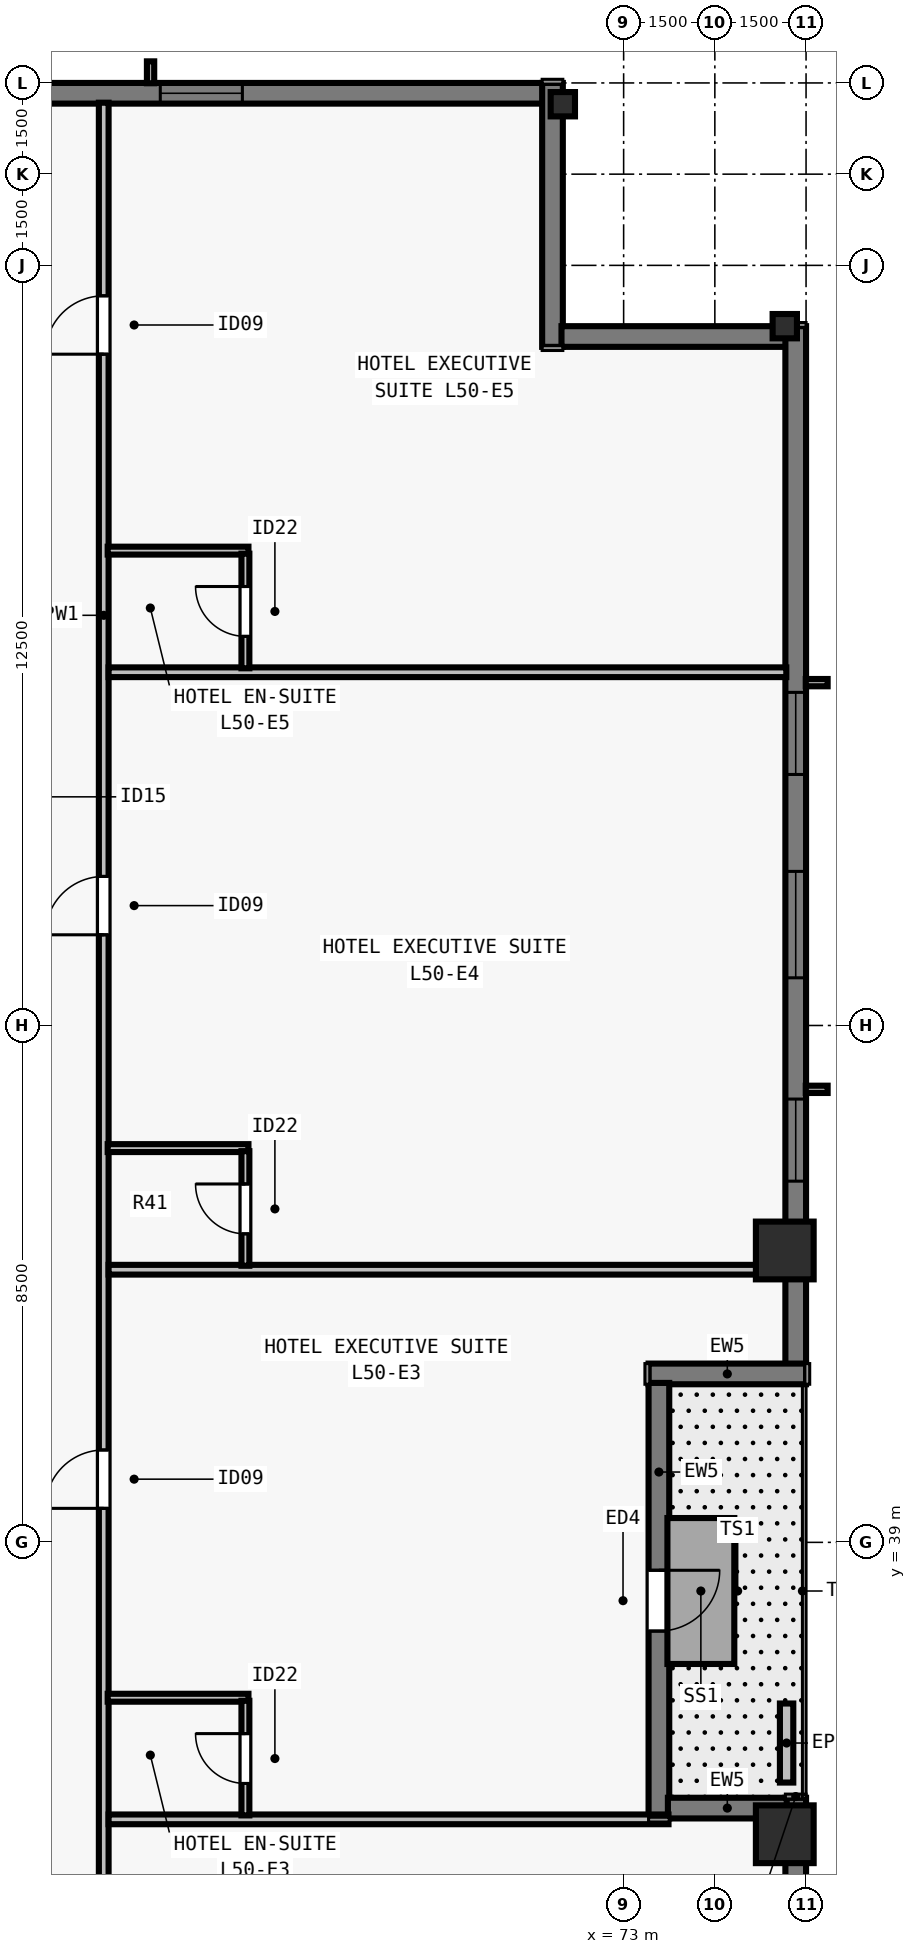
"""IFC4 building model, lengths in metres.
Left out: names, types, materials, properties, quantities, classifications, styles, units other than length and angle.
Written with IfcOpenShell. Run it as: python <this file> out.ifc"""

import sys

from ifc_helpers import new_model, si_unit, direction, frame, frame_2d, origin, origin_2d, place, context, subcontext, project, spatial, rectangle, i_section, extrude, element, fill, save


model = new_model("IFC4")
c1 = context("Model", 3, precision=1e-05, world=origin(), true_north=direction((0.0, 1.0)))
c2 = subcontext(c1, "Body", "Model", "MODEL_VIEW")
j1 = project(units=[si_unit("LENGTHUNIT", "METRE"), si_unit("PLANEANGLEUNIT", "RADIAN")], contexts=[c1])
p1 = place(None, origin())
s1 = spatial("IfcSite", under=j1, at=p1, CompositionType="ELEMENT")
p2 = place(p1, origin())
s2 = spatial("IfcBuilding", under=s1, at=p2, CompositionType="ELEMENT")
p3 = place(p2, frame((0.0, 0.0, 183.0)))
s3 = spatial("IfcBuildingStorey", under=s2, at=p3, CompositionType="ELEMENT", Elevation=183.0)
for number, where, z_axis, x_axis in (
    (1, (75.65, 34.2, 0.0), (0.0, 0.0, 1.0), (0.0, 1.0, 0.0)),
    (2, (75.65, 43.8, 0.0), (0.0, 0.0, 1.0), (0.0, 1.0, 0.0)),
):
    element("IfcColumn", number, at=place(p3, frame(where, z_axis=z_axis, x_axis=x_axis)), inside=s3, PredefinedType="COLUMN", context=c2, shape_type="SweptSolid", body=[
        extrude(rectangle(XDim=0.95, YDim=0.95, at=origin_2d()), origin(), (0.0, 0.0, 1.0), 3.5),
    ])
for number, where, z_axis, x_axis in (
    (3, (75.65, 59.0, 0.0), (0.0, 0.0, 1.0), (0.0, 1.0, 0.0)),
    (4, (72.0, 62.65, 0.0), (0.0, 0.0, 1.0), (1.0, 0.0, 0.0)),
):
    element("IfcColumn", number, at=place(p3, frame(where, z_axis=z_axis, x_axis=x_axis)), inside=s3, PredefinedType="COLUMN", context=c2, shape_type="SweptSolid", body=[
        extrude(i_section(OverallWidth=0.4, OverallDepth=0.4, WebThickness=0.022, FlangeThickness=0.036, at=origin_2d()), origin(), (0.0, 0.0, 1.0), 3.5),
    ])
p4 = place(p3, frame((75.83, 34.8, 0.0), z_axis=(0.0, 0.0, 1.0), x_axis=(0.0, -1.0, 0.0)))
e5 = element("IfcWall", 5, at=p4, inside=s3, PredefinedType="SOLIDWALL", context=c2, shape_type="SweptSolid", body=[
    extrude(rectangle(XDim=15.482, YDim=0.34, at=frame_2d((7.741, 0.0))), origin(), (0.0, 0.0, 1.0), 3.28),
])
p5 = place(p4, frame((2.305, 0.0, 0.8)))
e6 = element("IfcOpeningElement", 6, at=p5, cuts=e5, PredefinedType="OPENING", context=c2, shape_type="SweptSolid", body=[
    extrude(rectangle(XDim=1.35, YDim=1.66, at=frame_2d((0.675, 0.83))), frame((0.0, 0.18, 0.0), z_axis=(0.0, -1.0, 0.0), x_axis=(1.0, 0.0, 0.0)), (0.0, 0.0, 1.0), 0.36),
])
p6 = place(p4, frame((5.566, 0.0, 0.8)))
e7 = element("IfcOpeningElement", 7, at=p6, cuts=e5, PredefinedType="OPENING", context=c2, shape_type="SweptSolid", body=[
    extrude(rectangle(XDim=1.75, YDim=1.66, at=frame_2d((0.875, 0.83))), frame((0.0, 0.18, 0.0), z_axis=(0.0, -1.0, 0.0), x_axis=(1.0, 0.0, 0.0)), (0.0, 0.0, 1.0), 0.36),
])
p7 = place(p4, frame((8.377, 0.0, 0.8)))
e8 = element("IfcOpeningElement", 8, at=p7, cuts=e5, PredefinedType="OPENING", context=c2, shape_type="SweptSolid", body=[
    extrude(rectangle(XDim=1.35, YDim=1.66, at=frame_2d((0.675, 0.83))), frame((0.0, 0.18, 0.0), z_axis=(0.0, -1.0, 0.0), x_axis=(1.0, 0.0, 0.0)), (0.0, 0.0, 1.0), 0.36),
])
p8 = place(p3, frame((32.0, 62.83, 0.0), z_axis=(0.0, 0.0, 1.0), x_axis=(1.0, 0.0, 0.0)))
e9 = element("IfcWall", 9, at=p8, inside=s3, PredefinedType="SOLIDWALL", context=c2, shape_type="SweptSolid", body=[
    extrude(rectangle(XDim=39.682, YDim=0.34, at=frame_2d((19.841, 0.0))), origin(), (0.0, 0.0, 1.0), 3.28),
])
p9 = place(p8, frame((4.102, 0.0, 0.8)))
e10 = element("IfcOpeningElement", 10, at=p9, cuts=e9, PredefinedType="OPENING", context=c2, shape_type="SweptSolid", body=[
    extrude(rectangle(XDim=1.35, YDim=1.66, at=frame_2d((0.675, 0.83))), frame((0.0, 0.18, 0.0), z_axis=(0.0, -1.0, 0.0), x_axis=(1.0, 0.0, 0.0)), (0.0, 0.0, 1.0), 0.36),
])
p10 = place(p8, frame((8.755, 0.0, 0.8)))
e11 = element("IfcOpeningElement", 11, at=p10, cuts=e9, PredefinedType="OPENING", context=c2, shape_type="SweptSolid", body=[
    extrude(rectangle(XDim=1.75, YDim=1.66, at=frame_2d((0.875, 0.83))), frame((0.0, 0.18, 0.0), z_axis=(0.0, -1.0, 0.0), x_axis=(1.0, 0.0, 0.0)), (0.0, 0.0, 1.0), 0.36),
])
p11 = place(p8, frame((12.059, 0.0, 0.8)))
e12 = element("IfcOpeningElement", 12, at=p11, cuts=e9, PredefinedType="OPENING", context=c2, shape_type="SweptSolid", body=[
    extrude(rectangle(XDim=1.35, YDim=1.66, at=frame_2d((0.675, 0.83))), frame((0.0, 0.18, 0.0), z_axis=(0.0, -1.0, 0.0), x_axis=(1.0, 0.0, 0.0)), (0.0, 0.0, 1.0), 0.36),
])
p12 = place(p8, frame((16.262, 0.0, 0.8)))
e13 = element("IfcOpeningElement", 13, at=p12, cuts=e9, PredefinedType="OPENING", context=c2, shape_type="SweptSolid", body=[
    extrude(rectangle(XDim=1.75, YDim=1.66, at=frame_2d((0.875, 0.83))), frame((0.0, 0.18, 0.0), z_axis=(0.0, -1.0, 0.0), x_axis=(1.0, 0.0, 0.0)), (0.0, 0.0, 1.0), 0.36),
])
p13 = place(p8, frame((18.316, 0.0, 0.8)))
e14 = element("IfcOpeningElement", 14, at=p13, cuts=e9, PredefinedType="OPENING", context=c2, shape_type="SweptSolid", body=[
    extrude(rectangle(XDim=1.35, YDim=1.66, at=frame_2d((0.675, 0.83))), frame((0.0, 0.18, 0.0), z_axis=(0.0, -1.0, 0.0), x_axis=(1.0, 0.0, 0.0)), (0.0, 0.0, 1.0), 0.36),
])
p14 = place(p8, frame((22.07, 0.0, 0.8)))
e15 = element("IfcOpeningElement", 15, at=p14, cuts=e9, PredefinedType="OPENING", context=c2, shape_type="SweptSolid", body=[
    extrude(rectangle(XDim=1.75, YDim=1.66, at=frame_2d((0.875, 0.83))), frame((0.0, 0.18, 0.0), z_axis=(0.0, -1.0, 0.0), x_axis=(1.0, 0.0, 0.0)), (0.0, 0.0, 1.0), 0.36),
])
p15 = place(p8, frame((26.273, 0.0, 0.8)))
e16 = element("IfcOpeningElement", 16, at=p15, cuts=e9, PredefinedType="OPENING", context=c2, shape_type="SweptSolid", body=[
    extrude(rectangle(XDim=1.35, YDim=1.66, at=frame_2d((0.675, 0.83))), frame((0.0, 0.18, 0.0), z_axis=(0.0, -1.0, 0.0), x_axis=(1.0, 0.0, 0.0)), (0.0, 0.0, 1.0), 0.36),
])
p16 = place(p8, frame((33.38, 0.0, 0.8)))
e17 = element("IfcOpeningElement", 17, at=p16, cuts=e9, PredefinedType="OPENING", context=c2, shape_type="SweptSolid", body=[
    extrude(rectangle(XDim=1.35, YDim=1.66, at=frame_2d((0.675, 0.83))), frame((0.0, 0.18, 0.0), z_axis=(0.0, -1.0, 0.0), x_axis=(1.0, 0.0, 0.0)), (0.0, 0.0, 1.0), 0.36),
])
p17 = place(p3, frame((71.83, 63.0, 0.0), z_axis=(0.0, 0.0, 1.0), x_axis=(0.0, -1.0, 0.0)))
e18 = element("IfcWall", 18, at=p17, inside=s3, PredefinedType="SOLIDWALL", context=c2, shape_type="SweptSolid", body=[
    extrude(rectangle(XDim=4.34, YDim=0.34, at=frame_2d((2.17, 0.0))), origin(), (0.0, 0.0, 1.0), 3.28),
])
p18 = place(p3, frame((71.978, 58.83, 0.0), z_axis=(0.0, 0.0, 1.0), x_axis=(1.0, 0.0, 0.0)))
e19 = element("IfcWall", 19, at=p18, inside=s3, PredefinedType="SOLIDWALL", context=c2, shape_type="SweptSolid", body=[
    extrude(rectangle(XDim=3.704, YDim=0.34, at=frame_2d((1.852, 0.0))), origin(), (0.0, 0.0, 1.0), 3.28),
])
p19 = place(p3, frame((75.83, 59.0, 0.0), z_axis=(0.0, 0.0, 1.0), x_axis=(0.0, -1.0, 0.0)))
e20 = element("IfcWall", 20, at=p19, inside=s3, PredefinedType="SOLIDWALL", context=c2, shape_type="SweptSolid", body=[
    extrude(rectangle(XDim=17.082, YDim=0.34, at=frame_2d((8.541, 0.0))), origin(), (0.0, 0.0, 1.0), 3.28),
])
p20 = place(p19, frame((6.022, 0.0, 0.8)))
e21 = element("IfcOpeningElement", 21, at=p20, cuts=e20, PredefinedType="OPENING", context=c2, shape_type="SweptSolid", body=[
    extrude(rectangle(XDim=1.35, YDim=1.66, at=frame_2d((0.675, 0.83))), frame((0.0, 0.18, 0.0), z_axis=(0.0, -1.0, 0.0), x_axis=(1.0, 0.0, 0.0)), (0.0, 0.0, 1.0), 0.36),
])
p21 = place(p19, frame((8.966, 0.0, 0.8)))
e22 = element("IfcOpeningElement", 22, at=p21, cuts=e20, PredefinedType="OPENING", context=c2, shape_type="SweptSolid", body=[
    extrude(rectangle(XDim=1.75, YDim=1.66, at=frame_2d((0.875, 0.83))), frame((0.0, 0.18, 0.0), z_axis=(0.0, -1.0, 0.0), x_axis=(1.0, 0.0, 0.0)), (0.0, 0.0, 1.0), 0.36),
])
p22 = place(p19, frame((12.71, 0.0, 0.8)))
e23 = element("IfcOpeningElement", 23, at=p22, cuts=e20, PredefinedType="OPENING", context=c2, shape_type="SweptSolid", body=[
    extrude(rectangle(XDim=1.35, YDim=1.66, at=frame_2d((0.675, 0.83))), frame((0.0, 0.18, 0.0), z_axis=(0.0, -1.0, 0.0), x_axis=(1.0, 0.0, 0.0)), (0.0, 0.0, 1.0), 0.36),
])
p23 = place(p3, frame((76.0, 41.77, 0.0), z_axis=(0.0, 0.0, 1.0), x_axis=(-1.0, 0.0, 0.0)))
e24 = element("IfcWall", 24, at=p23, inside=s3, PredefinedType="SOLIDWALL", context=c2, shape_type="SweptSolid", body=[
    extrude(rectangle(XDim=2.59, YDim=0.34, at=frame_2d((1.295, 0.0))), origin(), (0.0, 0.0, 1.0), 3.28),
])
p24 = place(p3, frame((73.58, 41.622, 0.0), z_axis=(0.0, 0.0, 1.0), x_axis=(0.0, -1.0, 0.0)))
e25 = element("IfcWall", 25, at=p24, inside=s3, PredefinedType="SOLIDWALL", context=c2, shape_type="SweptSolid", body=[
    extrude(rectangle(XDim=7.162, YDim=0.34, at=frame_2d((3.581, 0.0))), origin(), (0.0, 0.0, 1.0), 3.28),
])
p25 = place(p24, frame((3.081, 0.0, 0.0)))
e26 = element("IfcOpeningElement", 26, at=p25, cuts=e25, PredefinedType="OPENING", context=c2, shape_type="SweptSolid", body=[
    extrude(rectangle(XDim=1.0, YDim=2.15, at=frame_2d((0.5, 1.075))), frame((0.0, 0.18, 0.0), z_axis=(0.0, -1.0, 0.0), x_axis=(1.0, 0.0, 0.0)), (0.0, 0.0, 1.0), 0.36),
])
p26 = place(p3, frame((73.728, 34.63, 0.0), z_axis=(0.0, 0.0, 1.0), x_axis=(1.0, 0.0, 0.0)))
e27 = element("IfcWall", 27, at=p26, inside=s3, PredefinedType="SOLIDWALL", context=c2, shape_type="SweptSolid", body=[
    extrude(rectangle(XDim=1.954, YDim=0.34, at=frame_2d((0.977, 0.0))), origin(), (0.0, 0.0, 1.0), 3.28),
])
p27 = place(p3, frame((75.68, 35.05, 0.0), z_axis=(0.0, 0.0, 1.0), x_axis=(0.0, 1.0, 0.0)))
e28 = element("IfcWall", 28, at=p27, inside=s3, PredefinedType="PARAPET", context=c2, shape_type="SweptSolid", body=[
    extrude(rectangle(XDim=1.3, YDim=0.22, at=frame_2d((0.65, 0.0))), origin(), (0.0, 0.0, 1.0), 0.55),
])
p28 = place(p3, frame((64.45, 15.325, 0.0), z_axis=(0.0, 0.0, 1.0), x_axis=(0.0, 1.0, 0.0)))
e29 = element("IfcWall", 29, at=p28, inside=s3, PredefinedType="PARTITIONING", context=c2, shape_type="SweptSolid", body=[
    extrude(rectangle(XDim=47.35, YDim=0.16, at=frame_2d((23.675, 0.0))), origin(), (0.0, 0.0, 1.0), 2.555),
])
p29 = place(p28, frame((5.515, 0.0, 0.0)))
e30 = element("IfcOpeningElement", 30, at=p29, cuts=e29, PredefinedType="OPENING", context=c2, shape_type="SweptSolid", body=[
    extrude(rectangle(XDim=0.96, YDim=2.15, at=frame_2d((0.48, 1.075))), frame((0.0, 0.09, 0.0), z_axis=(0.0, -1.0, 0.0), x_axis=(1.0, 0.0, 0.0)), (0.0, 0.0, 1.0), 0.18),
])
p30 = place(p28, frame((14.802, 0.0, 0.0)))
e31 = element("IfcOpeningElement", 31, at=p30, cuts=e29, PredefinedType="OPENING", context=c2, shape_type="SweptSolid", body=[
    extrude(rectangle(XDim=0.96, YDim=2.15, at=frame_2d((0.48, 1.075))), frame((0.0, 0.09, 0.0), z_axis=(0.0, -1.0, 0.0), x_axis=(1.0, 0.0, 0.0)), (0.0, 0.0, 1.0), 0.18),
])
p31 = place(p28, frame((24.234, 0.0, 0.0)))
e32 = element("IfcOpeningElement", 32, at=p31, cuts=e29, PredefinedType="OPENING", context=c2, shape_type="SweptSolid", body=[
    extrude(rectangle(XDim=0.96, YDim=2.15, at=frame_2d((0.48, 1.075))), frame((0.0, 0.09, 0.0), z_axis=(0.0, -1.0, 0.0), x_axis=(1.0, 0.0, 0.0)), (0.0, 0.0, 1.0), 0.18),
])
p32 = place(p28, frame((33.666, 0.0, 0.0)))
e33 = element("IfcOpeningElement", 33, at=p32, cuts=e29, PredefinedType="OPENING", context=c2, shape_type="SweptSolid", body=[
    extrude(rectangle(XDim=0.96, YDim=2.15, at=frame_2d((0.48, 1.075))), frame((0.0, 0.09, 0.0), z_axis=(0.0, -1.0, 0.0), x_axis=(1.0, 0.0, 0.0)), (0.0, 0.0, 1.0), 0.18),
])
p33 = place(p28, frame((43.214, 0.0, 0.0)))
e34 = element("IfcOpeningElement", 34, at=p33, cuts=e29, PredefinedType="OPENING", context=c2, shape_type="SweptSolid", body=[
    extrude(rectangle(XDim=0.96, YDim=2.15, at=frame_2d((0.48, 1.075))), frame((0.0, 0.09, 0.0), z_axis=(0.0, -1.0, 0.0), x_axis=(1.0, 0.0, 0.0)), (0.0, 0.0, 1.0), 0.18),
])
p34 = place(p3, frame((64.53, 34.445, 0.0), z_axis=(0.0, 0.0, 1.0), x_axis=(1.0, 0.0, 0.0)))
e35 = element("IfcWall", 35, at=p34, inside=s3, PredefinedType="PARTITIONING", context=c2, shape_type="SweptSolid", body=[
    extrude(rectangle(XDim=9.208, YDim=0.16, at=frame_2d((4.604, 0.0))), origin(), (0.0, 0.0, 1.0), 3.28),
])
p35 = place(p3, frame((64.515, 36.445, 0.0), z_axis=(0.0, 0.0, 1.0), x_axis=(1.0, 0.0, 0.0)))
e36 = element("IfcWall", 36, at=p35, inside=s3, PredefinedType="PLUMBINGWALL", context=c2, shape_type="SweptSolid", body=[
    extrude(rectangle(XDim=2.315, YDim=0.13, at=frame_2d((1.158, 0.0))), origin(), (0.0, 0.0, 1.0), 3.28),
])
p36 = place(p3, frame((66.78, 34.51, 0.0), z_axis=(0.0, 0.0, 1.0), x_axis=(0.0, 1.0, 0.0)))
e37 = element("IfcWall", 37, at=p36, inside=s3, PredefinedType="PLUMBINGWALL", context=c2, shape_type="SweptSolid", body=[
    extrude(rectangle(XDim=1.885, YDim=0.13, at=frame_2d((0.942, 0.0))), origin(), (0.0, 0.0, 1.0), 3.28),
])
p37 = place(p36, frame((0.525, 0.0, 0.0)))
e38 = element("IfcOpeningElement", 38, at=p37, cuts=e37, PredefinedType="OPENING", context=c2, shape_type="SweptSolid", body=[
    extrude(rectangle(XDim=0.82, YDim=2.1, at=frame_2d((0.41, 1.05))), frame((0.0, 0.075, 0.0), z_axis=(0.0, -1.0, 0.0), x_axis=(1.0, 0.0, 0.0)), (0.0, 0.0, 1.0), 0.15),
])
p38 = place(p3, frame((64.53, 43.484, 0.0), z_axis=(0.0, 0.0, 1.0), x_axis=(1.0, 0.0, 0.0)))
e39 = element("IfcWall", 39, at=p38, inside=s3, PredefinedType="PARTITIONING", context=c2, shape_type="SweptSolid", body=[
    extrude(rectangle(XDim=11.145, YDim=0.16, at=frame_2d((5.573, 0.0))), origin(), (0.0, 0.0, 1.0), 3.28),
])
p39 = place(p3, frame((64.515, 45.484, 0.0), z_axis=(0.0, 0.0, 1.0), x_axis=(1.0, 0.0, 0.0)))
e40 = element("IfcWall", 40, at=p39, inside=s3, PredefinedType="PLUMBINGWALL", context=c2, shape_type="SweptSolid", body=[
    extrude(rectangle(XDim=2.315, YDim=0.13, at=frame_2d((1.158, 0.0))), origin(), (0.0, 0.0, 1.0), 3.28),
])
p40 = place(p3, frame((66.78, 43.549, 0.0), z_axis=(0.0, 0.0, 1.0), x_axis=(0.0, 1.0, 0.0)))
e41 = element("IfcWall", 41, at=p40, inside=s3, PredefinedType="PLUMBINGWALL", context=c2, shape_type="SweptSolid", body=[
    extrude(rectangle(XDim=1.885, YDim=0.13, at=frame_2d((0.942, 0.0))), origin(), (0.0, 0.0, 1.0), 3.28),
])
p41 = place(p40, frame((0.525, 0.0, 0.0)))
e42 = element("IfcOpeningElement", 42, at=p41, cuts=e41, PredefinedType="OPENING", context=c2, shape_type="SweptSolid", body=[
    extrude(rectangle(XDim=0.82, YDim=2.1, at=frame_2d((0.41, 1.05))), frame((0.0, 0.075, 0.0), z_axis=(0.0, -1.0, 0.0), x_axis=(1.0, 0.0, 0.0)), (0.0, 0.0, 1.0), 0.15),
])
p42 = place(p3, frame((64.53, 53.309, 0.0), z_axis=(0.0, 0.0, 1.0), x_axis=(1.0, 0.0, 0.0)))
e43 = element("IfcWall", 43, at=p42, inside=s3, PredefinedType="PARTITIONING", context=c2, shape_type="SweptSolid", body=[
    extrude(rectangle(XDim=11.145, YDim=0.16, at=frame_2d((5.573, 0.0))), origin(), (0.0, 0.0, 1.0), 2.896),
])
p43 = place(p3, frame((64.515, 55.309, 0.0), z_axis=(0.0, 0.0, 1.0), x_axis=(1.0, 0.0, 0.0)))
e44 = element("IfcWall", 44, at=p43, inside=s3, PredefinedType="PLUMBINGWALL", context=c2, shape_type="SweptSolid", body=[
    extrude(rectangle(XDim=2.315, YDim=0.13, at=frame_2d((1.158, 0.0))), origin(), (0.0, 0.0, 1.0), 3.28),
])
p44 = place(p3, frame((66.78, 53.374, 0.0), z_axis=(0.0, 0.0, 1.0), x_axis=(0.0, 1.0, 0.0)))
e45 = element("IfcWall", 45, at=p44, inside=s3, PredefinedType="PLUMBINGWALL", context=c2, shape_type="SweptSolid", body=[
    extrude(rectangle(XDim=1.885, YDim=0.13, at=frame_2d((0.942, 0.0))), origin(), (0.0, 0.0, 1.0), 3.28),
])
p45 = place(p44, frame((0.525, 0.0, 0.0)))
e46 = element("IfcOpeningElement", 46, at=p45, cuts=e45, PredefinedType="OPENING", context=c2, shape_type="SweptSolid", body=[
    extrude(rectangle(XDim=0.82, YDim=2.1, at=frame_2d((0.41, 1.05))), frame((0.0, 0.075, 0.0), z_axis=(0.0, -1.0, 0.0), x_axis=(1.0, 0.0, 0.0)), (0.0, 0.0, 1.0), 0.15),
])
p46 = place(p16, origin())
e47 = element("IfcWindow", 47, at=p46, inside=s3, PartitioningType="SINGLE_PANEL", PredefinedType="WINDOW", context=c2, shape_type="SweptSolid", body=[
    extrude(rectangle(XDim=1.35, YDim=1.66, at=frame_2d((0.675, 0.83))), frame((0.0, -0.05, 0.0), z_axis=(0.0, -1.0, 0.0), x_axis=(1.0, 0.0, 0.0)), (0.0, 0.0, 1.0), 0.06),
])
fill(e17, e47)
p47 = place(p20, origin())
e48 = element("IfcWindow", 48, at=p47, inside=s3, PartitioningType="SINGLE_PANEL", PredefinedType="WINDOW", context=c2, shape_type="SweptSolid", body=[
    extrude(rectangle(XDim=1.35, YDim=1.66, at=frame_2d((0.675, 0.83))), frame((0.0, -0.05, 0.0), z_axis=(0.0, -1.0, 0.0), x_axis=(1.0, 0.0, 0.0)), (0.0, 0.0, 1.0), 0.06),
])
fill(e21, e48)
p48 = place(p21, origin())
e49 = element("IfcWindow", 49, at=p48, inside=s3, PartitioningType="SINGLE_PANEL", PredefinedType="WINDOW", context=c2, shape_type="SweptSolid", body=[
    extrude(rectangle(XDim=1.75, YDim=1.66, at=frame_2d((0.875, 0.83))), frame((0.0, -0.05, 0.0), z_axis=(0.0, -1.0, 0.0), x_axis=(1.0, 0.0, 0.0)), (0.0, 0.0, 1.0), 0.06),
])
fill(e22, e49)
p49 = place(p22, origin())
e50 = element("IfcWindow", 50, at=p49, inside=s3, PartitioningType="SINGLE_PANEL", PredefinedType="WINDOW", context=c2, shape_type="SweptSolid", body=[
    extrude(rectangle(XDim=1.35, YDim=1.66, at=frame_2d((0.675, 0.83))), frame((0.0, -0.05, 0.0), z_axis=(0.0, -1.0, 0.0), x_axis=(1.0, 0.0, 0.0)), (0.0, 0.0, 1.0), 0.06),
])
fill(e23, e50)
p50 = place(p25, origin())
e51 = element("IfcDoor", 51, at=p50, inside=s3, OperationType="SINGLE_SWING_LEFT", PredefinedType="DOOR", context=c2, shape_type="SweptSolid", body=[
    extrude(rectangle(XDim=1.0, YDim=2.15, at=frame_2d((0.5, 1.075))), frame((0.0, 0.025, 0.0), z_axis=(0.0, -1.0, 0.0), x_axis=(1.0, 0.0, 0.0)), (0.0, 0.0, 1.0), 0.05),
])
fill(e26, e51)
p51 = place(p37, origin())
e52 = element("IfcDoor", 52, at=p51, inside=s3, OperationType="SINGLE_SWING_RIGHT", PredefinedType="DOOR", context=c2, shape_type="SweptSolid", body=[
    extrude(rectangle(XDim=0.82, YDim=2.1, at=frame_2d((0.41, 1.05))), frame((0.0, 0.025, 0.0), z_axis=(0.0, -1.0, 0.0), x_axis=(1.0, 0.0, 0.0)), (0.0, 0.0, 1.0), 0.05),
])
fill(e38, e52)
p52 = place(p31, origin())
e53 = element("IfcDoor", 53, at=p52, inside=s3, OperationType="SINGLE_SWING_LEFT", PredefinedType="DOOR", context=c2, shape_type="SweptSolid", body=[
    extrude(rectangle(XDim=0.96, YDim=2.15, at=frame_2d((0.48, 1.075))), frame((0.0, 0.025, 0.0), z_axis=(0.0, -1.0, 0.0), x_axis=(1.0, 0.0, 0.0)), (0.0, 0.0, 1.0), 0.05),
])
fill(e32, e53)
p53 = place(p41, origin())
e54 = element("IfcDoor", 54, at=p53, inside=s3, OperationType="SINGLE_SWING_RIGHT", PredefinedType="DOOR", context=c2, shape_type="SweptSolid", body=[
    extrude(rectangle(XDim=0.82, YDim=2.1, at=frame_2d((0.41, 1.05))), frame((0.0, 0.025, 0.0), z_axis=(0.0, -1.0, 0.0), x_axis=(1.0, 0.0, 0.0)), (0.0, 0.0, 1.0), 0.05),
])
fill(e42, e54)
p54 = place(p32, origin())
e55 = element("IfcDoor", 55, at=p54, inside=s3, OperationType="SINGLE_SWING_LEFT", PredefinedType="DOOR", context=c2, shape_type="SweptSolid", body=[
    extrude(rectangle(XDim=0.96, YDim=2.15, at=frame_2d((0.48, 1.075))), frame((0.0, 0.025, 0.0), z_axis=(0.0, -1.0, 0.0), x_axis=(1.0, 0.0, 0.0)), (0.0, 0.0, 1.0), 0.05),
])
fill(e33, e55)
p55 = place(p45, origin())
e56 = element("IfcDoor", 56, at=p55, inside=s3, OperationType="SINGLE_SWING_RIGHT", PredefinedType="DOOR", context=c2, shape_type="SweptSolid", body=[
    extrude(rectangle(XDim=0.82, YDim=2.1, at=frame_2d((0.41, 1.05))), frame((0.0, 0.025, 0.0), z_axis=(0.0, -1.0, 0.0), x_axis=(1.0, 0.0, 0.0)), (0.0, 0.0, 1.0), 0.05),
])
fill(e46, e56)
p56 = place(p33, origin())
e57 = element("IfcDoor", 57, at=p56, inside=s3, OperationType="SINGLE_SWING_LEFT", PredefinedType="DOOR", context=c2, shape_type="SweptSolid", body=[
    extrude(rectangle(XDim=0.96, YDim=2.15, at=frame_2d((0.48, 1.075))), frame((0.0, 0.025, 0.0), z_axis=(0.0, -1.0, 0.0), x_axis=(1.0, 0.0, 0.0)), (0.0, 0.0, 1.0), 0.05),
])
fill(e34, e57)
save(model, sys.argv[1])
